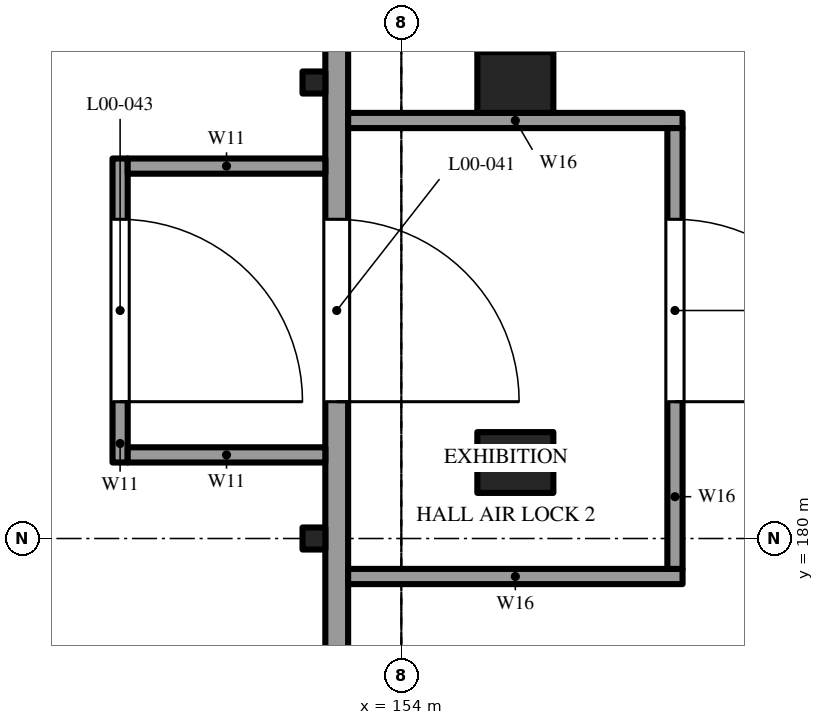
"""IFC4 building model, lengths in metres.
Left out: names, types, materials, properties, quantities, classifications, styles, units other than length and angle.
Written with IfcOpenShell. Run it as: python <this file> out.ifc"""

import sys

from ifc_helpers import new_model, si_unit, direction, frame, frame_2d, origin, origin_2d, place, context, subcontext, project, spatial, rectangle, i_section, extrude, element, fill, save


model = new_model("IFC4")
c1 = context("Model", 3, precision=1e-05, world=origin(), true_north=direction((0.0, 1.0)))
c2 = subcontext(c1, "Body", "Model", "MODEL_VIEW")
j1 = project(units=[si_unit("LENGTHUNIT", "METRE"), si_unit("PLANEANGLEUNIT", "RADIAN")], contexts=[c1])
p1 = place(None, origin())
s1 = spatial("IfcSite", under=j1, at=p1, CompositionType="ELEMENT")
p2 = place(p1, origin())
s2 = spatial("IfcBuilding", under=s1, at=p2, CompositionType="ELEMENT")
p3 = place(p2, origin())
s3 = spatial("IfcBuildingStorey", under=s2, at=p3, CompositionType="ELEMENT", Elevation=0.0)
for number, where, z_axis, x_axis in (
    (1, (152.85, 180.0, -0.4), (0.0, 0.0, 1.0), (1.0, 0.0, 0.0)),
    (2, (152.85, 186.0, -0.4), (0.0, 0.0, 1.0), (1.0, 0.0, 0.0)),
):
    element("IfcColumn", number, at=place(p3, frame(where, z_axis=z_axis, x_axis=x_axis)), inside=s3, PredefinedType="COLUMN", context=c2, shape_type="SweptSolid", body=[
        extrude(i_section(OverallWidth=0.3, OverallDepth=0.29, WebThickness=0.009, FlangeThickness=0.014, at=origin_2d()), origin(), (0.0, 0.0, 1.0), 7.6),
    ])
for number, where, z_axis, x_axis in (
    (3, (155.5, 181.0, -0.4), (0.0, 0.0, 1.0), (1.0, 0.0, 0.0)),
    (4, (155.5, 186.0, -0.4), (0.0, 0.0, 1.0), (1.0, 0.0, 0.0)),
):
    element("IfcColumn", number, at=place(p3, frame(where, z_axis=z_axis, x_axis=x_axis)), inside=s3, PredefinedType="COLUMN", context=c2, shape_type="SweptSolid", body=[
        extrude(rectangle(XDim=1.0, YDim=0.8, at=origin_2d()), origin(), (0.0, 0.0, 1.0), 7.6),
    ])
p4 = place(p3, frame((153.15, 132.15, 0.0), z_axis=(0.0, 0.0, 1.0), x_axis=(0.0, 1.0, 0.0)))
e5 = element("IfcWall", 5, at=p4, inside=s3, PredefinedType="SOLIDWALL", context=c2, shape_type="SweptSolid", body=[
    extrude(rectangle(XDim=83.7, YDim=0.3, at=frame_2d((41.85, 0.0))), origin(), (0.0, 0.0, 1.0), 7.2),
])
p5 = place(p4, frame((31.65, 0.0, 0.0)))
e6 = element("IfcOpeningElement", 6, at=p5, cuts=e5, PredefinedType="OPENING", context=c2, shape_type="SweptSolid", body=[
    extrude(rectangle(XDim=2.4, YDim=2.4, at=frame_2d((1.2, 1.2))), frame((0.0, 0.16, 0.0), z_axis=(0.0, -1.0, 0.0), x_axis=(1.0, 0.0, 0.0)), (0.0, 0.0, 1.0), 0.32),
])
p6 = place(p4, frame((49.65, 0.0, 0.0)))
e7 = element("IfcOpeningElement", 7, at=p6, cuts=e5, PredefinedType="OPENING", context=c2, shape_type="SweptSolid", body=[
    extrude(rectangle(XDim=2.4, YDim=2.4, at=frame_2d((1.2, 1.2))), frame((0.0, 0.16, 0.0), z_axis=(0.0, -1.0, 0.0), x_axis=(1.0, 0.0, 0.0)), (0.0, 0.0, 1.0), 0.32),
])
p7 = place(p3, frame((150.3, 181.0, 0.0), z_axis=(0.0, 0.0, 1.0), x_axis=(0.0, 1.0, 0.0)))
e8 = element("IfcWall", 8, at=p7, inside=s3, PredefinedType="SOLIDWALL", context=c2, shape_type="SweptSolid", body=[
    extrude(rectangle(XDim=4.0, YDim=0.2, at=frame_2d((2.0, 0.0))), origin(), (0.0, 0.0, 1.0), 3.4),
])
p8 = place(p7, frame((0.8, 0.0, 0.0)))
e9 = element("IfcOpeningElement", 9, at=p8, cuts=e8, PredefinedType="OPENING", context=c2, shape_type="SweptSolid", body=[
    extrude(rectangle(XDim=2.4, YDim=2.4, at=frame_2d((1.2, 1.2))), frame((0.0, 0.11, 0.0), z_axis=(0.0, -1.0, 0.0), x_axis=(1.0, 0.0, 0.0)), (0.0, 0.0, 1.0), 0.22),
])
for number, where, z_axis, x_axis in (
    (10, (150.4, 181.1, 0.0), (0.0, 0.0, 1.0), (1.0, 0.0, 0.0)),
    (11, (150.4, 184.9, 0.0), (0.0, 0.0, 1.0), (1.0, 0.0, 0.0)),
):
    element("IfcWall", number, at=place(p3, frame(where, z_axis=z_axis, x_axis=x_axis)), inside=s3, PredefinedType="SOLIDWALL", context=c2, shape_type="SweptSolid", body=[
        extrude(rectangle(XDim=2.6, YDim=0.2, at=frame_2d((1.3, 0.0))), origin(), (0.0, 0.0, 1.0), 3.4),
    ])
for number, where, z_axis, x_axis in (
    (12, (153.3, 179.5, 0.0), (0.0, 0.0, 1.0), (1.0, 0.0, 0.0)),
    (13, (153.3, 185.5, 0.0), (0.0, 0.0, 1.0), (1.0, 0.0, 0.0)),
):
    element("IfcWall", number, at=place(p3, frame(where, z_axis=z_axis, x_axis=x_axis)), inside=s3, PredefinedType="SOLIDWALL", context=c2, shape_type="SweptSolid", body=[
        extrude(rectangle(XDim=4.4, YDim=0.2, at=frame_2d((2.2, 0.0))), origin(), (0.0, 0.0, 1.0), 4.3),
    ])
p9 = place(p3, frame((157.6, 179.6, 0.0), z_axis=(0.0, 0.0, 1.0), x_axis=(0.0, 1.0, 0.0)))
e14 = element("IfcWall", 14, at=p9, inside=s3, PredefinedType="SOLIDWALL", context=c2, shape_type="SweptSolid", body=[
    extrude(rectangle(XDim=5.8, YDim=0.2, at=frame_2d((2.9, 0.0))), origin(), (0.0, 0.0, 1.0), 4.3),
])
p10 = place(p9, frame((2.2, 0.0, 0.0)))
e15 = element("IfcOpeningElement", 15, at=p10, cuts=e14, PredefinedType="OPENING", context=c2, shape_type="SweptSolid", body=[
    extrude(rectangle(XDim=2.4, YDim=2.4, at=frame_2d((1.2, 1.2))), frame((0.0, 0.11, 0.0), z_axis=(0.0, -1.0, 0.0), x_axis=(1.0, 0.0, 0.0)), (0.0, 0.0, 1.0), 0.22),
])
p11 = place(p6, frame((2.4, 0.0, 0.0), z_axis=(0.0, 0.0, 1.0), x_axis=(-1.0, 0.0, 0.0)))
e16 = element("IfcDoor", 16, at=p11, inside=s3, OperationType="DOUBLE_DOOR_SINGLE_SWING", PredefinedType="DOOR", context=c2, shape_type="SweptSolid", body=[
    extrude(rectangle(XDim=2.4, YDim=2.4, at=frame_2d((1.2, 1.2))), frame((0.0, 0.025, 0.0), z_axis=(0.0, -1.0, 0.0), x_axis=(1.0, 0.0, 0.0)), (0.0, 0.0, 1.0), 0.05),
])
fill(e7, e16)
p12 = place(p8, frame((2.4, 0.0, 0.0), z_axis=(0.0, 0.0, 1.0), x_axis=(-1.0, 0.0, 0.0)))
e17 = element("IfcDoor", 17, at=p12, inside=s3, OperationType="DOUBLE_DOOR_SINGLE_SWING", PredefinedType="DOOR", context=c2, shape_type="SweptSolid", body=[
    extrude(rectangle(XDim=2.4, YDim=2.4, at=frame_2d((1.2, 1.2))), frame((0.0, 0.025, 0.0), z_axis=(0.0, -1.0, 0.0), x_axis=(1.0, 0.0, 0.0)), (0.0, 0.0, 1.0), 0.05),
])
fill(e9, e17)
p13 = place(p10, frame((2.4, 0.0, 0.0), z_axis=(0.0, 0.0, 1.0), x_axis=(-1.0, 0.0, 0.0)))
e18 = element("IfcDoor", 18, at=p13, inside=s3, OperationType="DOUBLE_DOOR_SINGLE_SWING", PredefinedType="DOOR", context=c2, shape_type="SweptSolid", body=[
    extrude(rectangle(XDim=2.4, YDim=2.4, at=frame_2d((1.2, 1.2))), frame((0.0, 0.025, 0.0), z_axis=(0.0, -1.0, 0.0), x_axis=(1.0, 0.0, 0.0)), (0.0, 0.0, 1.0), 0.05),
])
fill(e15, e18)
save(model, sys.argv[1])
